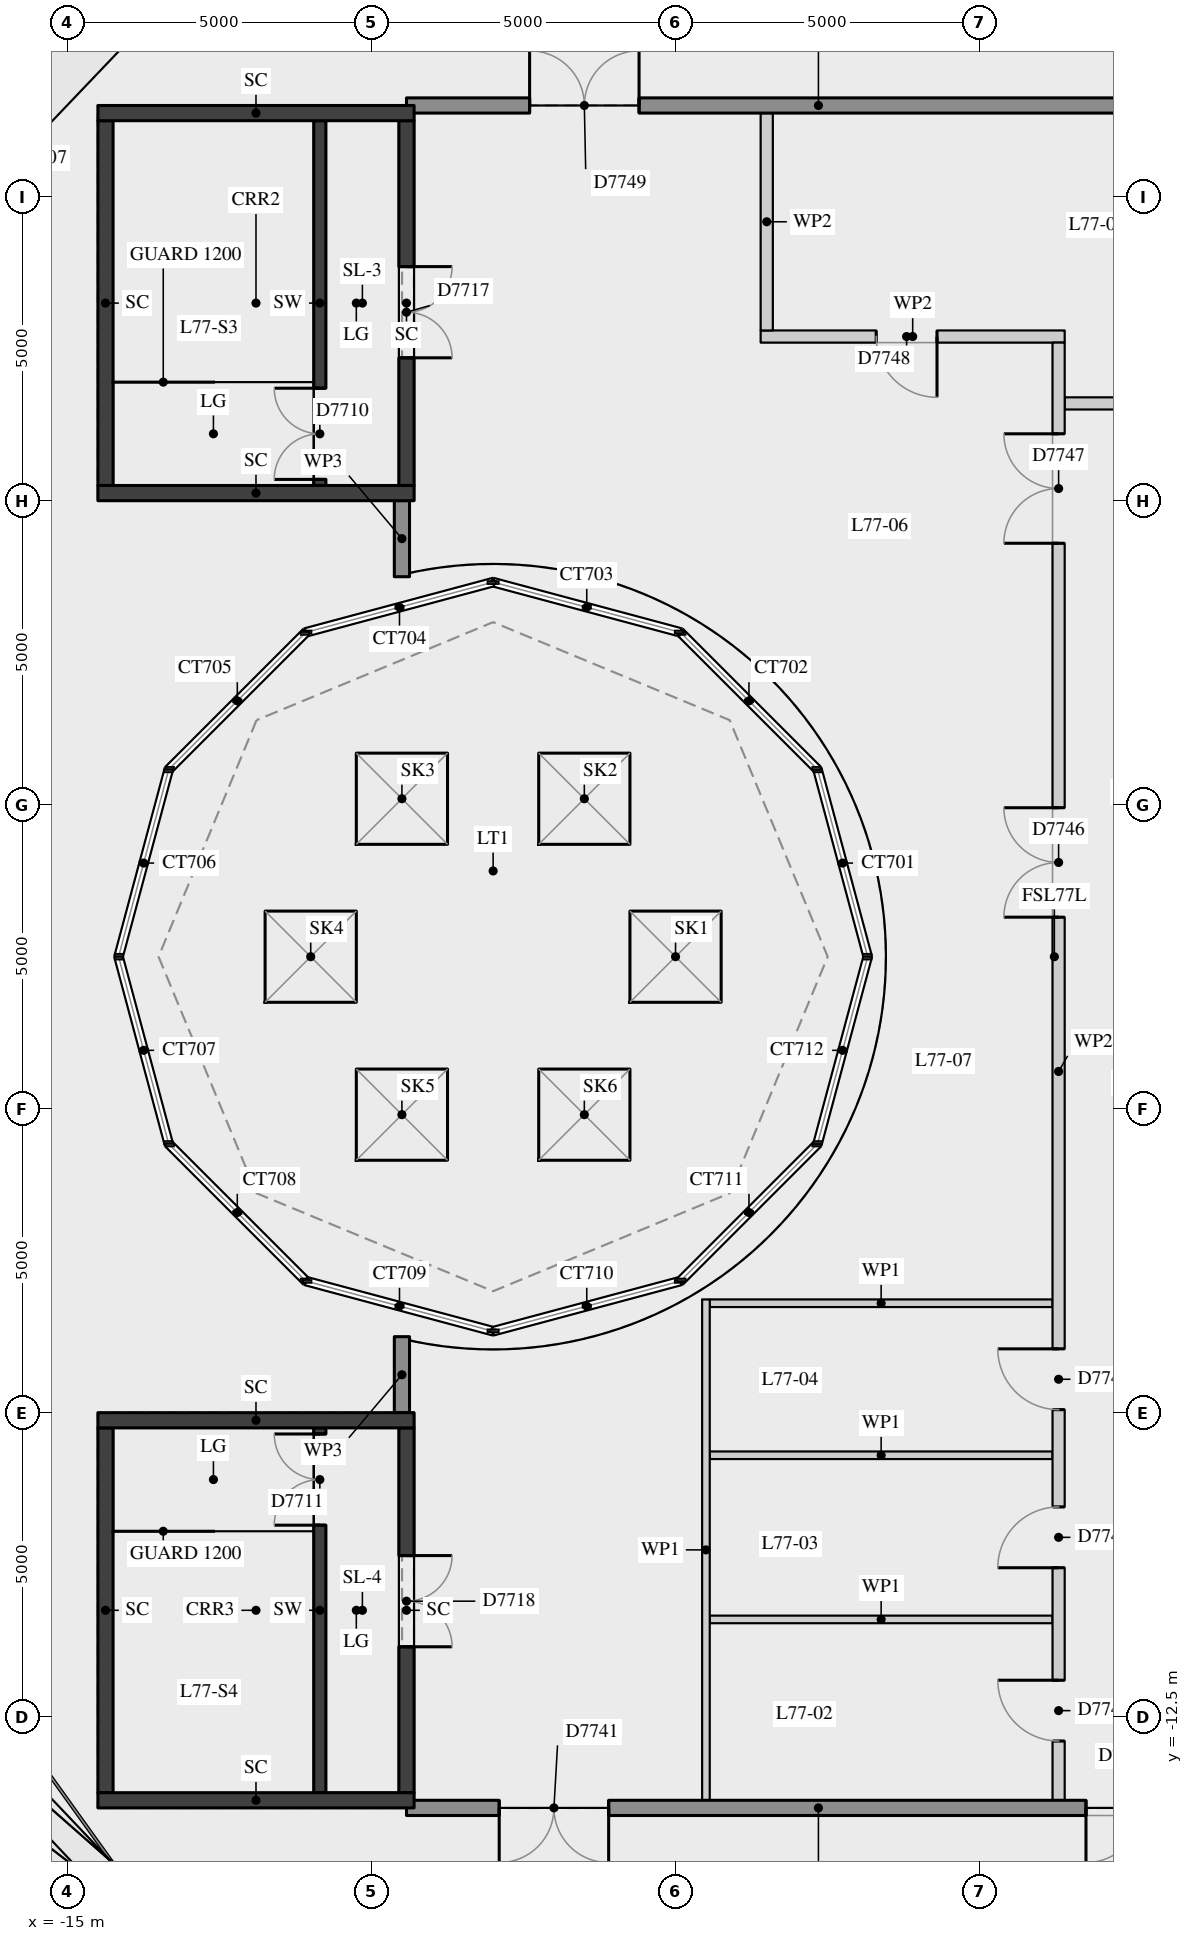
"""IFC4 building model, lengths in metres.
Left out: names, types, materials, properties, quantities, classifications, styles, units other than length and angle.
Written with IfcOpenShell. Run it as: python <this file> out.ifc"""

import sys

from ifc_helpers import new_model, si_unit, direction, frame, frame_2d, origin, origin_2d, place, context, subcontext, project, spatial, rectangle, extrude, element, fill, save


model = new_model("IFC4")
c1 = context("Model", 3, precision=1e-05, world=origin(), true_north=direction((0.0, 1.0)))
c2 = subcontext(c1, "Body", "Model", "MODEL_VIEW")
j1 = project(units=[si_unit("LENGTHUNIT", "METRE"), si_unit("PLANEANGLEUNIT", "RADIAN")], contexts=[c1])
p1 = place(None, origin())
s1 = spatial("IfcSite", under=j1, at=p1, CompositionType="ELEMENT")
p2 = place(p1, origin())
s2 = spatial("IfcBuilding", under=s1, at=p2, CompositionType="ELEMENT")
p3 = place(p2, frame((0.0, 0.0, 275.2)))
s3 = spatial("IfcBuildingStorey", under=s2, at=p3, CompositionType="ELEMENT", Elevation=275.2)
p4 = place(p3, frame((-10.85, 7.75, 0.0), z_axis=(0.0, 0.0, 1.0), x_axis=(0.0, 1.0, 0.0)))
e1 = element("IfcWall", 1, at=p4, inside=s3, PredefinedType="SHEAR", context=c2, shape_type="SweptSolid", body=[
    extrude(rectangle(XDim=6.0, YDim=0.2, at=frame_2d((3.0, 0.0))), origin(), (0.0, 0.0, 1.0), 5.0),
])
p5 = place(p4, frame((0.1, 0.0, 0.0)))
e2 = element("IfcOpeningElement", 2, at=p5, cuts=e1, PredefinedType="OPENING", context=c2, shape_type="SweptSolid", body=[
    extrude(rectangle(XDim=1.5, YDim=2.1, at=frame_2d((0.75, 1.05))), frame((0.0, 0.11, 0.0), z_axis=(0.0, -1.0, 0.0), x_axis=(1.0, 0.0, 0.0)), (0.0, 0.0, 1.0), 0.22),
])
p6 = place(p3, frame((-10.85, -13.75, 0.0), z_axis=(0.0, 0.0, 1.0), x_axis=(0.0, 1.0, 0.0)))
e3 = element("IfcWall", 3, at=p6, inside=s3, PredefinedType="SHEAR", context=c2, shape_type="SweptSolid", body=[
    extrude(rectangle(XDim=6.0, YDim=0.2, at=frame_2d((3.0, 0.0))), origin(), (0.0, 0.0, 1.0), 5.0),
])
p7 = place(p6, frame((4.4, 0.0, 0.0)))
e4 = element("IfcOpeningElement", 4, at=p7, cuts=e3, PredefinedType="OPENING", context=c2, shape_type="SweptSolid", body=[
    extrude(rectangle(XDim=1.5, YDim=2.1, at=frame_2d((0.75, 1.05))), frame((0.0, 0.11, 0.0), z_axis=(0.0, -1.0, 0.0), x_axis=(1.0, 0.0, 0.0)), (0.0, 0.0, 1.0), 0.22),
])
p8 = place(p3, frame((-14.375, 7.75, -0.3), z_axis=(0.0, 0.0, 1.0), x_axis=(0.0, 1.0, 0.0)))
e5 = element("IfcWall", 5, at=p8, inside=s3, PredefinedType="SHEAR", context=c2, shape_type="SweptSolid", body=[
    extrude(rectangle(XDim=6.0, YDim=0.25, at=frame_2d((3.0, 0.0))), origin(), (0.0, 0.0, 1.0), 5.3),
])
p9 = place(p3, frame((-9.425, 7.75, -0.3), z_axis=(0.0, 0.0, 1.0), x_axis=(0.0, 1.0, 0.0)))
e6 = element("IfcWall", 6, at=p9, inside=s3, PredefinedType="SHEAR", context=c2, shape_type="SweptSolid", body=[
    extrude(rectangle(XDim=6.0, YDim=0.25, at=frame_2d((3.0, 0.0))), origin(), (0.0, 0.0, 1.0), 5.3),
])
p10 = place(p9, frame((2.1, 0.0, 0.3)))
e7 = element("IfcOpeningElement", 7, at=p10, cuts=e6, PredefinedType="OPENING", context=c2, shape_type="SweptSolid", body=[
    extrude(rectangle(XDim=1.5, YDim=2.1, at=frame_2d((0.75, 1.05))), frame((0.0, 0.135, 0.0), z_axis=(0.0, -1.0, 0.0), x_axis=(1.0, 0.0, 0.0)), (0.0, 0.0, 1.0), 0.27),
])
for number, where, z_axis, x_axis in (
    (8, (-14.5, 13.875, -0.3), (0.0, 0.0, 1.0), (1.0, 0.0, 0.0)),
    (9, (-14.5, 7.625, -0.3), (0.0, 0.0, 1.0), (1.0, 0.0, 0.0)),
):
    element("IfcWall", number, at=place(p3, frame(where, z_axis=z_axis, x_axis=x_axis)), inside=s3, PredefinedType="SHEAR", context=c2, shape_type="SweptSolid", body=[
        extrude(rectangle(XDim=5.2, YDim=0.25, at=frame_2d((2.6, 0.0))), origin(), (0.0, 0.0, 1.0), 5.3),
    ])
p11 = place(p3, frame((-14.375, -13.75, -0.3), z_axis=(0.0, 0.0, 1.0), x_axis=(0.0, 1.0, 0.0)))
e10 = element("IfcWall", 10, at=p11, inside=s3, PredefinedType="SHEAR", context=c2, shape_type="SweptSolid", body=[
    extrude(rectangle(XDim=6.0, YDim=0.25, at=frame_2d((3.0, 0.0))), origin(), (0.0, 0.0, 1.0), 5.3),
])
p12 = place(p3, frame((-9.425, -13.75, -0.3), z_axis=(0.0, 0.0, 1.0), x_axis=(0.0, 1.0, 0.0)))
e11 = element("IfcWall", 11, at=p12, inside=s3, PredefinedType="SHEAR", context=c2, shape_type="SweptSolid", body=[
    extrude(rectangle(XDim=6.0, YDim=0.25, at=frame_2d((3.0, 0.0))), origin(), (0.0, 0.0, 1.0), 5.3),
])
p13 = place(p12, frame((2.4, 0.0, 0.3)))
e12 = element("IfcOpeningElement", 12, at=p13, cuts=e11, PredefinedType="OPENING", context=c2, shape_type="SweptSolid", body=[
    extrude(rectangle(XDim=1.5, YDim=2.1, at=frame_2d((0.75, 1.05))), frame((0.0, 0.135, 0.0), z_axis=(0.0, -1.0, 0.0), x_axis=(1.0, 0.0, 0.0)), (0.0, 0.0, 1.0), 0.27),
])
for number, where, z_axis, x_axis in (
    (13, (-14.5, -7.625, -0.3), (0.0, 0.0, 1.0), (1.0, 0.0, 0.0)),
    (14, (-14.5, -13.875, -0.3), (0.0, 0.0, 1.0), (1.0, 0.0, 0.0)),
):
    element("IfcWall", number, at=place(p3, frame(where, z_axis=z_axis, x_axis=x_axis)), inside=s3, PredefinedType="SHEAR", context=c2, shape_type="SweptSolid", body=[
        extrude(rectangle(XDim=5.2, YDim=0.25, at=frame_2d((2.6, 0.0))), origin(), (0.0, 0.0, 1.0), 5.3),
    ])
p14 = place(p3, frame((-9.425, -14.0, 0.0), z_axis=(0.0, 0.0, 1.0), x_axis=(1.0, 0.0, 0.0)))
e15 = element("IfcWall", 15, at=p14, inside=s3, PredefinedType="PARTITIONING", context=c2, shape_type="SweptSolid", body=[
    extrude(rectangle(XDim=13.55, YDim=0.25, at=frame_2d((6.775, 0.0))), origin(), (0.0, 0.0, 1.0), 6.0),
])
p15 = place(p14, frame((1.525, 0.0, 0.0)))
e16 = element("IfcOpeningElement", 16, at=p15, cuts=e15, PredefinedType="OPENING", context=c2, shape_type="SweptSolid", body=[
    extrude(rectangle(XDim=1.8, YDim=2.4, at=frame_2d((0.9, 1.2))), frame((0.0, 0.135, 0.0), z_axis=(0.0, -1.0, 0.0), x_axis=(1.0, 0.0, 0.0)), (0.0, 0.0, 1.0), 0.27),
])
p16 = place(p14, frame((11.175, 0.0, 0.0)))
e17 = element("IfcOpeningElement", 17, at=p16, cuts=e15, PredefinedType="OPENING", context=c2, shape_type="SweptSolid", body=[
    extrude(rectangle(XDim=1.8, YDim=2.4, at=frame_2d((0.9, 1.2))), frame((0.0, 0.135, 0.0), z_axis=(0.0, -1.0, 0.0), x_axis=(1.0, 0.0, 0.0)), (0.0, 0.0, 1.0), 0.27),
])
for number, where, z_axis, x_axis in (
    (18, (-4.438, -10.9, 0.0), (0.0, 0.0, 1.0), (1.0, 0.0, 0.0)),
    (19, (-4.438, -8.2, 0.0), (0.0, 0.0, 1.0), (1.0, 0.0, 0.0)),
    (20, (-4.438, -5.7, 0.0), (0.0, 0.0, 1.0), (1.0, 0.0, 0.0)),
):
    element("IfcWall", number, at=place(p3, frame(where, z_axis=z_axis, x_axis=x_axis)), inside=s3, PredefinedType="PARTITIONING", context=c2, shape_type="SweptSolid", body=[
        extrude(rectangle(XDim=5.637, YDim=0.125, at=frame_2d((2.819, 0.0))), origin(), (0.0, 0.0, 1.0), 6.0),
    ])
p17 = place(p3, frame((1.4, 9.1, 0.0), z_axis=(0.0, 0.0, 1.0), x_axis=(1.0, 0.0, 0.0)))
e21 = element("IfcWall", 21, at=p17, inside=s3, PredefinedType="PARTITIONING", context=c2, shape_type="SweptSolid", body=[
    extrude(rectangle(XDim=2.602, YDim=0.2, at=frame_2d((1.301, 0.0))), origin(), (0.0, 0.0, 1.0), 6.0),
])
p18 = place(p3, frame((-3.6, 10.2, 0.0), z_axis=(0.0, 0.0, 1.0), x_axis=(1.0, 0.0, 0.0)))
e22 = element("IfcWall", 22, at=p18, inside=s3, PredefinedType="PARTITIONING", context=c2, shape_type="SweptSolid", body=[
    extrude(rectangle(XDim=5.0, YDim=0.2, at=frame_2d((2.5, 0.0))), origin(), (0.0, 0.0, 1.0), 6.0),
])
p19 = place(p18, frame((1.9, 0.0, 0.0)))
e23 = element("IfcOpeningElement", 23, at=p19, cuts=e22, PredefinedType="OPENING", context=c2, shape_type="SweptSolid", body=[
    extrude(rectangle(XDim=1.0, YDim=2.1, at=frame_2d((0.5, 1.05))), frame((0.0, 0.11, 0.0), z_axis=(0.0, -1.0, 0.0), x_axis=(1.0, 0.0, 0.0)), (0.0, 0.0, 1.0), 0.22),
])
p20 = place(p3, frame((-9.425, 14.0, 0.0), z_axis=(0.0, 0.0, 1.0), x_axis=(1.0, 0.0, 0.0)))
e24 = element("IfcWall", 24, at=p20, inside=s3, PredefinedType="PARTITIONING", context=c2, shape_type="SweptSolid", body=[
    extrude(rectangle(XDim=13.55, YDim=0.25, at=frame_2d((6.775, 0.0))), origin(), (0.0, 0.0, 1.0), 6.0),
])
p21 = place(p20, frame((2.025, 0.0, 0.0)))
e25 = element("IfcOpeningElement", 25, at=p21, cuts=e24, PredefinedType="OPENING", context=c2, shape_type="SweptSolid", body=[
    extrude(rectangle(XDim=1.8, YDim=2.4, at=frame_2d((0.9, 1.2))), frame((0.0, 0.135, 0.0), z_axis=(0.0, -1.0, 0.0), x_axis=(1.0, 0.0, 0.0)), (0.0, 0.0, 1.0), 0.27),
])
for number, where, z_axis, x_axis in (
    (26, (-9.5, -7.502, 0.0), (0.0, 0.0, 1.0), (0.0, 1.0, 0.0)),
    (27, (-9.5, 6.25, 0.0), (0.0, 0.0, 1.0), (0.0, 1.0, 0.0)),
):
    element("IfcWall", number, at=place(p3, frame(where, z_axis=z_axis, x_axis=x_axis)), inside=s3, PredefinedType="PARTITIONING", context=c2, shape_type="SweptSolid", body=[
        extrude(rectangle(XDim=1.252, YDim=0.25, at=frame_2d((0.626, 0.0))), origin(), (0.0, 0.0, 1.0), 6.0),
    ])
p22 = place(p3, frame((-4.5, -13.875, 0.0), z_axis=(0.0, 0.0, 1.0), x_axis=(0.0, 1.0, 0.0)))
e28 = element("IfcWall", 28, at=p22, inside=s3, PredefinedType="PARTITIONING", context=c2, shape_type="SweptSolid", body=[
    extrude(rectangle(XDim=8.238, YDim=0.125, at=frame_2d((4.119, 0.0))), origin(), (0.0, 0.0, 1.0), 6.0),
])
p23 = place(p3, frame((-3.5, 10.3, 0.0), z_axis=(0.0, 0.0, 1.0), x_axis=(0.0, 1.0, 0.0)))
e29 = element("IfcWall", 29, at=p23, inside=s3, PredefinedType="PARTITIONING", context=c2, shape_type="SweptSolid", body=[
    extrude(rectangle(XDim=3.575, YDim=0.2, at=frame_2d((1.788, 0.0))), origin(), (0.0, 0.0, 1.0), 6.0),
])
p24 = place(p3, frame((1.3, -13.875, 0.0), z_axis=(0.0, 0.0, 1.0), x_axis=(0.0, 1.0, 0.0)))
e30 = element("IfcWall", 30, at=p24, inside=s3, PredefinedType="PARTITIONING", context=c2, shape_type="SweptSolid", body=[
    extrude(rectangle(XDim=23.975, YDim=0.2, at=frame_2d((11.988, 0.0))), origin(), (0.0, 0.0, 1.0), 6.0),
])
p25 = place(p24, frame((20.675, 0.0, 0.0)))
e31 = element("IfcOpeningElement", 31, at=p25, cuts=e30, PredefinedType="OPENING", context=c2, shape_type="SweptSolid", body=[
    extrude(rectangle(XDim=1.8, YDim=2.1, at=frame_2d((0.9, 1.05))), frame((0.0, 0.11, 0.0), z_axis=(0.0, -1.0, 0.0), x_axis=(1.0, 0.0, 0.0)), (0.0, 0.0, 1.0), 0.22),
])
p26 = place(p24, frame((14.525, 0.0, 0.0)))
e32 = element("IfcOpeningElement", 32, at=p26, cuts=e30, PredefinedType="OPENING", context=c2, shape_type="SweptSolid", body=[
    extrude(rectangle(XDim=1.8, YDim=2.1, at=frame_2d((0.9, 1.05))), frame((0.0, 0.11, 0.0), z_axis=(0.0, -1.0, 0.0), x_axis=(1.0, 0.0, 0.0)), (0.0, 0.0, 1.0), 0.22),
])
p27 = place(p24, frame((0.975, 0.0, 0.0)))
e33 = element("IfcOpeningElement", 33, at=p27, cuts=e30, PredefinedType="OPENING", context=c2, shape_type="SweptSolid", body=[
    extrude(rectangle(XDim=1.0, YDim=2.1, at=frame_2d((0.5, 1.05))), frame((0.0, 0.11, 0.0), z_axis=(0.0, -1.0, 0.0), x_axis=(1.0, 0.0, 0.0)), (0.0, 0.0, 1.0), 0.22),
])
p28 = place(p24, frame((3.825, 0.0, 0.0)))
e34 = element("IfcOpeningElement", 34, at=p28, cuts=e30, PredefinedType="OPENING", context=c2, shape_type="SweptSolid", body=[
    extrude(rectangle(XDim=1.0, YDim=2.1, at=frame_2d((0.5, 1.05))), frame((0.0, 0.11, 0.0), z_axis=(0.0, -1.0, 0.0), x_axis=(1.0, 0.0, 0.0)), (0.0, 0.0, 1.0), 0.22),
])
p29 = place(p24, frame((6.425, 0.0, 0.0)))
e35 = element("IfcOpeningElement", 35, at=p29, cuts=e30, PredefinedType="OPENING", context=c2, shape_type="SweptSolid", body=[
    extrude(rectangle(XDim=1.0, YDim=2.1, at=frame_2d((0.5, 1.05))), frame((0.0, 0.11, 0.0), z_axis=(0.0, -1.0, 0.0), x_axis=(1.0, 0.0, 0.0)), (0.0, 0.0, 1.0), 0.22),
])
p30 = place(p3, frame((0.0, 0.0, 1.8)))
p31 = place(p30, frame((-5.0, 0.0, 0.0)))
p32 = place(p31, frame((0.0, 0.0, 0.1)))
e36 = element("IfcWindow", 36, at=p32, inside=s3, PartitioningType="SINGLE_PANEL", PredefinedType="SKYLIGHT", context=c2, shape_type="SweptSolid", body=[
    extrude(rectangle(XDim=1.5, YDim=1.5, at=origin_2d()), origin(), (0.0, 0.0, 1.0), 0.05),
])
p33 = place(p30, frame((-6.5, 2.598, 0.0)))
p34 = place(p33, frame((0.0, 0.0, 0.1)))
e37 = element("IfcWindow", 37, at=p34, inside=s3, PartitioningType="SINGLE_PANEL", PredefinedType="SKYLIGHT", context=c2, shape_type="SweptSolid", body=[
    extrude(rectangle(XDim=1.5, YDim=1.5, at=origin_2d()), origin(), (0.0, 0.0, 1.0), 0.05),
])
p35 = place(p30, frame((-9.5, 2.598, 0.0)))
p36 = place(p35, frame((0.0, 0.0, 0.1)))
e38 = element("IfcWindow", 38, at=p36, inside=s3, PartitioningType="SINGLE_PANEL", PredefinedType="SKYLIGHT", context=c2, shape_type="SweptSolid", body=[
    extrude(rectangle(XDim=1.5, YDim=1.5, at=origin_2d()), origin(), (0.0, 0.0, 1.0), 0.05),
])
p37 = place(p30, frame((-11.0, 0.0, 0.0)))
p38 = place(p37, frame((0.0, 0.0, 0.1)))
e39 = element("IfcWindow", 39, at=p38, inside=s3, PartitioningType="SINGLE_PANEL", PredefinedType="SKYLIGHT", context=c2, shape_type="SweptSolid", body=[
    extrude(rectangle(XDim=1.5, YDim=1.5, at=origin_2d()), origin(), (0.0, 0.0, 1.0), 0.05),
])
p39 = place(p30, frame((-9.5, -2.598, 0.0)))
p40 = place(p39, frame((0.0, 0.0, 0.1)))
e40 = element("IfcWindow", 40, at=p40, inside=s3, PartitioningType="SINGLE_PANEL", PredefinedType="SKYLIGHT", context=c2, shape_type="SweptSolid", body=[
    extrude(rectangle(XDim=1.5, YDim=1.5, at=origin_2d()), origin(), (0.0, 0.0, 1.0), 0.05),
])
p41 = place(p30, frame((-6.5, -2.598, 0.0)))
p42 = place(p41, frame((0.0, 0.0, 0.1)))
e41 = element("IfcWindow", 41, at=p42, inside=s3, PartitioningType="SINGLE_PANEL", PredefinedType="SKYLIGHT", context=c2, shape_type="SweptSolid", body=[
    extrude(rectangle(XDim=1.5, YDim=1.5, at=origin_2d()), origin(), (0.0, 0.0, 1.0), 0.05),
])
p43 = place(p5, origin())
e42 = element("IfcDoor", 42, at=p43, inside=s3, OperationType="DOUBLE_DOOR_SINGLE_SWING", PredefinedType="DOOR", context=c2, shape_type="SweptSolid", body=[
    extrude(rectangle(XDim=1.5, YDim=2.1, at=frame_2d((0.75, 1.05))), frame((0.0, 0.025, 0.0), z_axis=(0.0, -1.0, 0.0), x_axis=(1.0, 0.0, 0.0)), (0.0, 0.0, 1.0), 0.05),
])
fill(e2, e42)
p44 = place(p7, origin())
e43 = element("IfcDoor", 43, at=p44, inside=s3, OperationType="DOUBLE_DOOR_SINGLE_SWING", PredefinedType="DOOR", context=c2, shape_type="SweptSolid", body=[
    extrude(rectangle(XDim=1.5, YDim=2.1, at=frame_2d((0.75, 1.05))), frame((0.0, 0.025, 0.0), z_axis=(0.0, -1.0, 0.0), x_axis=(1.0, 0.0, 0.0)), (0.0, 0.0, 1.0), 0.05),
])
fill(e4, e43)
p45 = place(p10, origin())
e44 = element("IfcDoor", 44, at=p45, inside=s3, OperationType="DOUBLE_DOOR_SINGLE_SWING", PredefinedType="DOOR", context=c2, shape_type="SweptSolid", body=[
    extrude(rectangle(XDim=1.5, YDim=2.1, at=frame_2d((0.75, 1.05))), frame((0.0, 0.025, 0.0), z_axis=(0.0, -1.0, 0.0), x_axis=(1.0, 0.0, 0.0)), (0.0, 0.0, 1.0), 0.05),
])
fill(e7, e44)
p46 = place(p13, origin())
e45 = element("IfcDoor", 45, at=p46, inside=s3, OperationType="DOUBLE_DOOR_SINGLE_SWING", PredefinedType="DOOR", context=c2, shape_type="SweptSolid", body=[
    extrude(rectangle(XDim=1.5, YDim=2.1, at=frame_2d((0.75, 1.05))), frame((0.0, 0.025, 0.0), z_axis=(0.0, -1.0, 0.0), x_axis=(1.0, 0.0, 0.0)), (0.0, 0.0, 1.0), 0.05),
])
fill(e12, e45)
p47 = place(p25, origin())
e46 = element("IfcDoor", 46, at=p47, inside=s3, OperationType="DOUBLE_DOOR_SINGLE_SWING", PredefinedType="DOOR", context=c2, shape_type="SweptSolid", body=[
    extrude(rectangle(XDim=1.8, YDim=2.1, at=frame_2d((0.9, 1.05))), frame((0.0, 0.025, 0.0), z_axis=(0.0, -1.0, 0.0), x_axis=(1.0, 0.0, 0.0)), (0.0, 0.0, 1.0), 0.05),
])
fill(e31, e46)
p48 = place(p26, origin())
e47 = element("IfcDoor", 47, at=p48, inside=s3, OperationType="DOUBLE_DOOR_SINGLE_SWING", PredefinedType="DOOR", context=c2, shape_type="SweptSolid", body=[
    extrude(rectangle(XDim=1.8, YDim=2.1, at=frame_2d((0.9, 1.05))), frame((0.0, 0.025, 0.0), z_axis=(0.0, -1.0, 0.0), x_axis=(1.0, 0.0, 0.0)), (0.0, 0.0, 1.0), 0.05),
])
fill(e32, e47)
p49 = place(p19, origin())
e48 = element("IfcDoor", 48, at=p49, inside=s3, OperationType="SINGLE_SWING_LEFT", PredefinedType="DOOR", context=c2, shape_type="SweptSolid", body=[
    extrude(rectangle(XDim=1.0, YDim=2.1, at=frame_2d((0.5, 1.05))), frame((0.0, 0.025, 0.0), z_axis=(0.0, -1.0, 0.0), x_axis=(1.0, 0.0, 0.0)), (0.0, 0.0, 1.0), 0.05),
])
fill(e23, e48)
p50 = place(p27, origin())
e49 = element("IfcDoor", 49, at=p50, inside=s3, OperationType="SINGLE_SWING_RIGHT", PredefinedType="DOOR", context=c2, shape_type="SweptSolid", body=[
    extrude(rectangle(XDim=1.0, YDim=2.1, at=frame_2d((0.5, 1.05))), frame((0.0, 0.025, 0.0), z_axis=(0.0, -1.0, 0.0), x_axis=(1.0, 0.0, 0.0)), (0.0, 0.0, 1.0), 0.05),
])
fill(e33, e49)
p51 = place(p28, origin())
e50 = element("IfcDoor", 50, at=p51, inside=s3, OperationType="SINGLE_SWING_LEFT", PredefinedType="DOOR", context=c2, shape_type="SweptSolid", body=[
    extrude(rectangle(XDim=1.0, YDim=2.1, at=frame_2d((0.5, 1.05))), frame((0.0, 0.025, 0.0), z_axis=(0.0, -1.0, 0.0), x_axis=(1.0, 0.0, 0.0)), (0.0, 0.0, 1.0), 0.05),
])
fill(e34, e50)
p52 = place(p29, origin())
e51 = element("IfcDoor", 51, at=p52, inside=s3, OperationType="SINGLE_SWING_RIGHT", PredefinedType="DOOR", context=c2, shape_type="SweptSolid", body=[
    extrude(rectangle(XDim=1.0, YDim=2.1, at=frame_2d((0.5, 1.05))), frame((0.0, 0.025, 0.0), z_axis=(0.0, -1.0, 0.0), x_axis=(1.0, 0.0, 0.0)), (0.0, 0.0, 1.0), 0.05),
])
fill(e35, e51)
p53 = place(p21, origin())
e52 = element("IfcDoor", 52, at=p53, inside=s3, OperationType="DOUBLE_DOOR_SINGLE_SWING", PredefinedType="DOOR", context=c2, shape_type="SweptSolid", body=[
    extrude(rectangle(XDim=1.8, YDim=2.4, at=frame_2d((0.9, 1.2))), frame((0.0, 0.025, 0.0), z_axis=(0.0, -1.0, 0.0), x_axis=(1.0, 0.0, 0.0)), (0.0, 0.0, 1.0), 0.05),
])
fill(e25, e52)
p54 = place(p15, origin())
e53 = element("IfcDoor", 53, at=p54, inside=s3, OperationType="DOUBLE_DOOR_SINGLE_SWING", PredefinedType="DOOR", context=c2, shape_type="SweptSolid", body=[
    extrude(rectangle(XDim=1.8, YDim=2.4, at=frame_2d((0.9, 1.2))), frame((0.0, 0.025, 0.0), z_axis=(0.0, -1.0, 0.0), x_axis=(1.0, 0.0, 0.0)), (0.0, 0.0, 1.0), 0.05),
])
fill(e16, e53)
p55 = place(p16, origin())
e54 = element("IfcDoor", 54, at=p55, inside=s3, OperationType="DOUBLE_DOOR_SINGLE_SWING", PredefinedType="DOOR", context=c2, shape_type="SweptSolid", body=[
    extrude(rectangle(XDim=1.8, YDim=2.4, at=frame_2d((0.9, 1.2))), frame((0.0, 0.025, 0.0), z_axis=(0.0, -1.0, 0.0), x_axis=(1.0, 0.0, 0.0)), (0.0, 0.0, 1.0), 0.05),
])
fill(e17, e54)
save(model, sys.argv[1])
